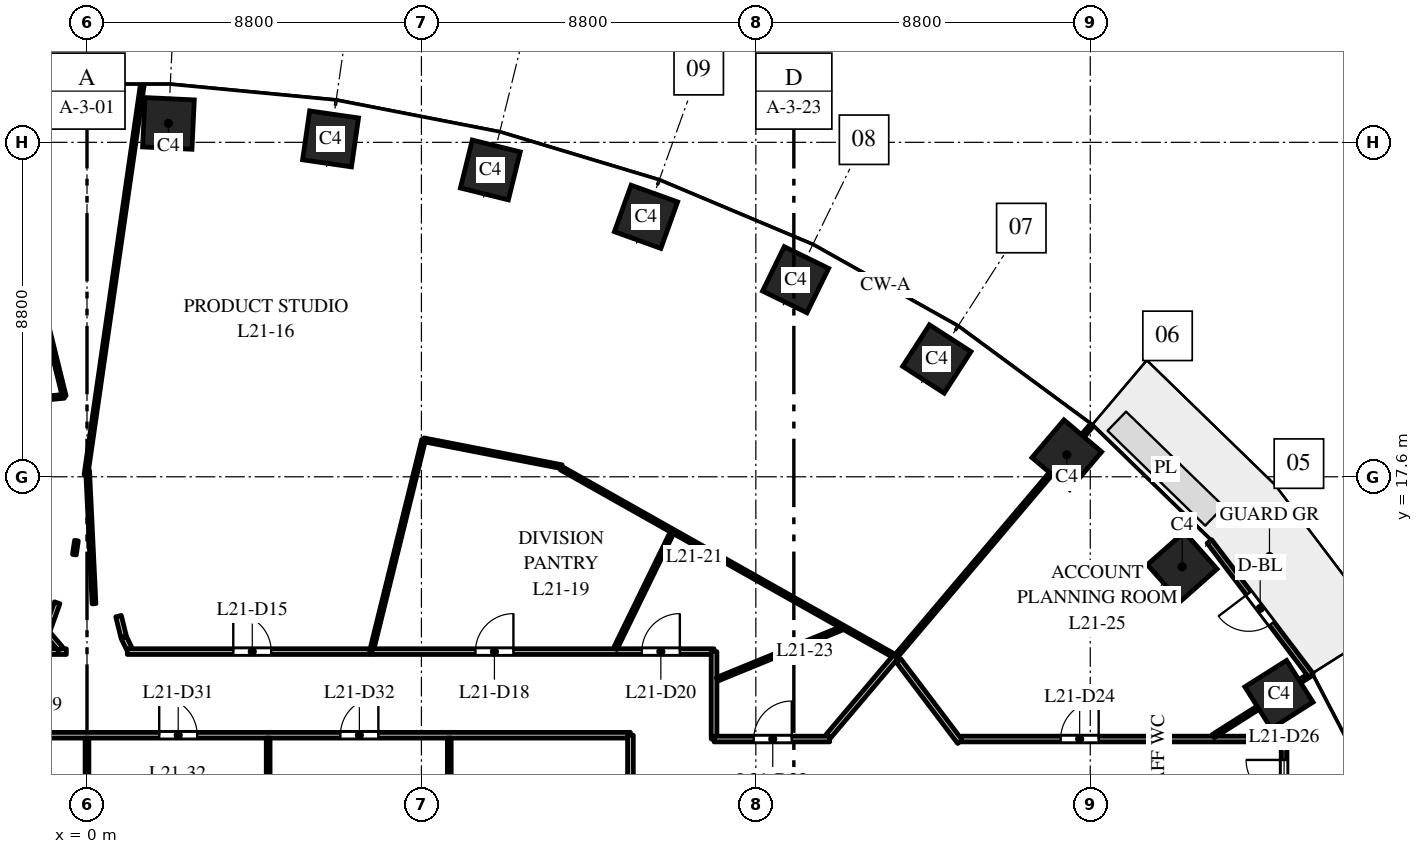
"""IFC4 building model, lengths in metres.
Left out: names, types, materials, properties, quantities, classifications, styles, units other than length and angle.
Written with IfcOpenShell. Run it as: python <this file> out.ifc"""

import sys

from ifc_helpers import new_model, si_unit, direction, frame, frame_2d, origin, origin_2d, place, context, subcontext, project, spatial, rectangle, extrude, element, fill, save


model = new_model("IFC4")
c1 = context("Model", 3, precision=1e-05, world=origin(), true_north=direction((0.0, 1.0)))
c2 = subcontext(c1, "Body", "Model", "MODEL_VIEW")
j1 = project(units=[si_unit("LENGTHUNIT", "METRE"), si_unit("PLANEANGLEUNIT", "RADIAN")], contexts=[c1])
p1 = place(None, origin())
s1 = spatial("IfcSite", under=j1, at=p1, CompositionType="ELEMENT")
p2 = place(p1, origin())
s2 = spatial("IfcBuilding", under=s1, at=p2, CompositionType="ELEMENT")
p3 = place(p2, frame((0.0, 0.0, 96.0)))
s3 = spatial("IfcBuildingStorey", under=s2, at=p3, CompositionType="ELEMENT", Elevation=96.0)
for number, where, z_axis, x_axis in (
    (1, (31.365, 11.871, 0.0), (0.0, 0.0, 1.0), (-0.535, 0.845, 0.0)),
    (2, (28.819, 15.23, 0.0), (0.0, 0.0, 1.0), (-0.663, 0.749, 0.0)),
    (3, (25.783, 18.18, 0.0), (0.0, 0.0, 1.0), (-0.763, 0.646, 0.0)),
    (4, (22.362, 20.7, 0.0), (0.0, 0.0, 1.0), (-0.84, 0.542, 0.0)),
    (5, (18.646, 22.785, 0.0), (0.0, 0.0, 1.0), (-0.898, 0.439, 0.0)),
    (6, (14.709, 24.441, 0.0), (0.0, 0.0, 1.0), (-0.941, 0.338, 0.0)),
    (7, (10.613, 25.674, 0.0), (0.0, 0.0, 1.0), (-0.971, 0.24, 0.0)),
    (8, (6.409, 26.491, 0.0), (0.0, 0.0, 1.0), (-0.99, 0.143, 0.0)),
    (9, (2.143, 26.898, 0.0), (0.0, 0.0, 1.0), (-0.999, 0.048, 0.0)),
):
    element("IfcColumn", number, at=place(p3, frame(where, z_axis=z_axis, x_axis=x_axis)), inside=s3, PredefinedType="COLUMN", context=c2, shape_type="SweptSolid", body=[
        extrude(rectangle(XDim=1.3, YDim=1.3, at=origin_2d()), origin(), (0.0, 0.0, 1.0), 4.0),
    ])
p4 = place(p3, frame((32.208, 12.374, 0.0), z_axis=(0.0, 0.0, 1.0), x_axis=(-0.604045763106, 0.796949632081, 0.0)))
e10 = element("IfcWall", 10, at=p4, inside=s3, PredefinedType="STANDARD", context=c2, shape_type="SweptSolid", body=[
    extrude(rectangle(XDim=4.423, YDim=0.15, at=frame_2d((2.212, 0.0))), origin(), (0.0, 0.0, 1.0), 3.7),
])
p5 = place(p4, frame((1.712, 0.0, 0.0)))
e11 = element("IfcOpeningElement", 11, at=p5, cuts=e10, PredefinedType="OPENING", context=c2, shape_type="SweptSolid", body=[
    extrude(rectangle(XDim=1.0, YDim=2.4, at=frame_2d((0.5, 1.2))), frame((0.0, 0.085, 0.0), z_axis=(0.0, -1.0, 0.0), x_axis=(1.0, 0.0, 0.0)), (0.0, 0.0, 1.0), 0.17),
])
p6 = place(p3, frame((-14.3, 10.8, 0.0), z_axis=(0.0, 0.0, 1.0), x_axis=(1.0, 0.0, 0.0)))
e12 = element("IfcWall", 12, at=p6, inside=s3, PredefinedType="PARTITIONING", context=c2, shape_type="SweptSolid", body=[
    extrude(rectangle(XDim=28.6, YDim=0.15, at=frame_2d((14.3, 0.0))), origin(), (0.0, 0.0, 1.0), 2.85),
])
p7 = place(p6, frame((11.433, 0.0, 0.0)))
e13 = element("IfcOpeningElement", 13, at=p7, cuts=e12, PredefinedType="OPENING", context=c2, shape_type="SweptSolid", body=[
    extrude(rectangle(XDim=1.0, YDim=2.1, at=frame_2d((0.5, 1.05))), frame((0.0, 0.085, 0.0), z_axis=(0.0, -1.0, 0.0), x_axis=(1.0, 0.0, 0.0)), (0.0, 0.0, 1.0), 0.17),
])
p8 = place(p6, frame((16.2, 0.0, 0.0)))
e14 = element("IfcOpeningElement", 14, at=p8, cuts=e12, PredefinedType="OPENING", context=c2, shape_type="SweptSolid", body=[
    extrude(rectangle(XDim=1.0, YDim=2.1, at=frame_2d((0.5, 1.05))), frame((0.0, 0.085, 0.0), z_axis=(0.0, -1.0, 0.0), x_axis=(1.0, 0.0, 0.0)), (0.0, 0.0, 1.0), 0.17),
])
p9 = place(p6, frame((20.967, 0.0, 0.0)))
e15 = element("IfcOpeningElement", 15, at=p9, cuts=e12, PredefinedType="OPENING", context=c2, shape_type="SweptSolid", body=[
    extrude(rectangle(XDim=1.0, YDim=2.1, at=frame_2d((0.5, 1.05))), frame((0.0, 0.085, 0.0), z_axis=(0.0, -1.0, 0.0), x_axis=(1.0, 0.0, 0.0)), (0.0, 0.0, 1.0), 0.17),
])
p10 = place(p3, frame((-8.802, 18.935, 0.0), z_axis=(0.0, 0.0, 1.0), x_axis=(0.995486812939, 0.094899975054, 0.0)))
e16 = element("IfcWall", 16, at=p10, inside=s3, PredefinedType="PARTITIONING", context=c2, shape_type="SweptSolid", body=[
    extrude(rectangle(XDim=8.24, YDim=0.1, at=frame_2d((4.12, 0.0))), origin(), (0.0, 0.0, 1.0), 2.85),
])
p11 = place(p3, frame((-7.767, 13.0, 0.0), z_axis=(0.0, 0.0, 1.0), x_axis=(1.0, 0.0, 0.0)))
e17 = element("IfcWall", 17, at=p11, inside=s3, PredefinedType="PARTITIONING", context=c2, shape_type="SweptSolid", body=[
    extrude(rectangle(XDim=7.223, YDim=0.15, at=frame_2d((3.612, 0.0))), origin(), (0.0, 0.0, 1.0), 2.85),
])
p12 = place(p11, frame((2.974, 0.0, 0.0)))
e18 = element("IfcOpeningElement", 18, at=p12, cuts=e17, PredefinedType="OPENING", context=c2, shape_type="SweptSolid", body=[
    extrude(rectangle(XDim=1.0, YDim=2.1, at=frame_2d((0.5, 1.05))), frame((0.0, 0.085, 0.0), z_axis=(0.0, -1.0, 0.0), x_axis=(1.0, 0.0, 0.0)), (0.0, 0.0, 1.0), 0.17),
])
p13 = place(p3, frame((-2.609, 27.858, 0.0), z_axis=(0.0, 0.0, 1.0), x_axis=(0.239677840558, -0.970852477334, 0.0)))
e19 = element("IfcWall", 19, at=p13, inside=s3, PredefinedType="PARTITIONING", context=c2, shape_type="SweptSolid", body=[
    extrude(rectangle(XDim=8.385, YDim=0.1, at=frame_2d((4.193, 0.0))), origin(), (0.0, 0.0, 1.0), 2.85),
])
p14 = place(p3, frame((-1.122, 13.57, 0.0), z_axis=(0.0, 0.0, 1.0), x_axis=(0.648780487805, -0.760975609756, 0.0)))
e20 = element("IfcWall", 20, at=p14, inside=s3, PredefinedType="PARTITIONING", context=c2, shape_type="SweptSolid", body=[
    extrude(rectangle(XDim=0.651, YDim=0.15, at=frame_2d((0.325, 0.0))), origin(), (0.0, 0.0, 1.0), 2.85),
])
p15 = place(p3, frame((-1.035, 13.586, 0.0), z_axis=(0.0, 0.0, 1.0), x_axis=(0.337939421495, 0.941167863561, 0.0)))
e21 = element("IfcWall", 21, at=p15, inside=s3, PredefinedType="PARTITIONING", context=c2, shape_type="SweptSolid", body=[
    extrude(rectangle(XDim=0.743, YDim=0.15, at=frame_2d((0.371, 0.0))), origin(), (0.0, 0.0, 1.0), 2.85),
])
p16 = place(p3, frame((-0.331, 15.551, 0.0), z_axis=(0.0, 0.0, 1.0), x_axis=(0.142155020728, 0.989844407006, 0.0)))
e22 = element("IfcWall", 22, at=p16, inside=s3, PredefinedType="PARTITIONING", context=c2, shape_type="SweptSolid", body=[
    extrude(rectangle(XDim=0.373, YDim=0.1, at=frame_2d((0.187, 0.0))), origin(), (0.0, 0.0, 1.0), 3.7),
])
p17 = place(p3, frame((-0.027, 17.654, 0.0), z_axis=(0.0, 0.0, 1.0), x_axis=(0.142950746257, 0.989729803605, 0.0)))
e23 = element("IfcWall", 23, at=p17, inside=s3, PredefinedType="PARTITIONING", context=c2, shape_type="SweptSolid", body=[
    extrude(rectangle(XDim=10.346, YDim=0.1, at=frame_2d((5.173, 0.0))), origin(), (0.0, 0.0, 1.0), 2.9),
])
p18 = place(p3, frame((0.0, 7.504, 0.0), z_axis=(0.0, 0.0, 1.0), x_axis=(0.0, 1.0, 0.0)))
e24 = element("IfcWall", 24, at=p18, inside=s3, PredefinedType="PARTITIONING", context=c2, shape_type="SweptSolid", body=[
    extrude(rectangle(XDim=3.221, YDim=0.1, at=frame_2d((1.611, 0.0))), origin(), (0.0, 0.0, 1.0), 3.7),
])
p19 = place(p3, frame((0.016, 17.767, 0.0), z_axis=(0.0, 0.0, 1.0), x_axis=(0.047839350467, -0.99885504281, 0.0)))
e25 = element("IfcWall", 25, at=p19, inside=s3, PredefinedType="PARTITIONING", context=c2, shape_type="SweptSolid", body=[
    extrude(rectangle(XDim=3.511, YDim=0.1, at=frame_2d((1.755, 0.0))), origin(), (0.0, 0.0, 1.0), 3.7),
])
p20 = place(p3, frame((0.83, 13.933, 0.0), z_axis=(0.0, 0.0, 1.0), x_axis=(0.239578315167, -0.970877042113, 0.0)))
e26 = element("IfcWall", 26, at=p20, inside=s3, PredefinedType="PARTITIONING", context=c2, shape_type="SweptSolid", body=[
    extrude(rectangle(XDim=0.563, YDim=0.15, at=frame_2d((0.282, 0.0))), origin(), (0.0, 0.0, 1.0), 3.7),
])
p21 = place(p3, frame((0.969, 13.369, 0.0), z_axis=(0.0, 0.0, 1.0), x_axis=(0.440240923942, -0.897879685084, 0.0)))
e27 = element("IfcWall", 27, at=p21, inside=s3, PredefinedType="PARTITIONING", context=c2, shape_type="SweptSolid", body=[
    extrude(rectangle(XDim=0.323, YDim=0.15, at=frame_2d((0.161, 0.0))), origin(), (0.0, 0.0, 1.0), 3.7),
])
p22 = place(p3, frame((1.061, 13.0, 0.0), z_axis=(0.0, 0.0, 1.0), x_axis=(1.0, 0.0, 0.0)))
e28 = element("IfcWall", 28, at=p22, inside=s3, PredefinedType="PARTITIONING", context=c2, shape_type="SweptSolid", body=[
    extrude(rectangle(XDim=6.422, YDim=0.15, at=frame_2d((3.211, 0.0))), origin(), (0.0, 0.0, 1.0), 2.85),
])
p23 = place(p22, frame((2.788, 0.0, 0.0)))
e29 = element("IfcOpeningElement", 29, at=p23, cuts=e28, PredefinedType="OPENING", context=c2, shape_type="SweptSolid", body=[
    extrude(rectangle(XDim=1.0, YDim=2.1, at=frame_2d((0.5, 1.05))), frame((0.0, 0.085, 0.0), z_axis=(0.0, -1.0, 0.0), x_axis=(1.0, 0.0, 0.0)), (0.0, 0.0, 1.0), 0.17),
])
p24 = place(p3, frame((4.767, 6.363, 0.0), z_axis=(0.0, 0.0, 1.0), x_axis=(0.0, 1.0, 0.0)))
e30 = element("IfcWall", 30, at=p24, inside=s3, PredefinedType="PARTITIONING", context=c2, shape_type="SweptSolid", body=[
    extrude(rectangle(XDim=4.362, YDim=0.1, at=frame_2d((2.181, 0.0))), origin(), (0.0, 0.0, 1.0), 2.85),
])
p25 = place(p3, frame((7.483, 13.0, 0.0), z_axis=(0.0, 0.0, 1.0), x_axis=(0.239702552944, 0.970846376165, 0.0)))
e31 = element("IfcWall", 31, at=p25, inside=s3, PredefinedType="PARTITIONING", context=c2, shape_type="SweptSolid", body=[
    extrude(rectangle(XDim=5.74, YDim=0.1, at=frame_2d((2.87, 0.0))), origin(), (0.0, 0.0, 1.0), 3.7),
])
p26 = place(p3, frame((7.499, 13.0, 0.0), z_axis=(0.0, 0.0, 1.0), x_axis=(1.0, 0.0, 0.0)))
e32 = element("IfcWall", 32, at=p26, inside=s3, PredefinedType="PARTITIONING", context=c2, shape_type="SweptSolid", body=[
    extrude(rectangle(XDim=9.001, YDim=0.15, at=frame_2d((4.5, 0.0))), origin(), (0.0, 0.0, 1.0), 2.85),
])
p27 = place(p26, frame((2.722, 0.0, 0.0)))
e33 = element("IfcOpeningElement", 33, at=p27, cuts=e32, PredefinedType="OPENING", context=c2, shape_type="SweptSolid", body=[
    extrude(rectangle(XDim=1.0, YDim=2.1, at=frame_2d((0.5, 1.05))), frame((0.0, 0.085, 0.0), z_axis=(0.0, -1.0, 0.0), x_axis=(1.0, 0.0, 0.0)), (0.0, 0.0, 1.0), 0.17),
])
p28 = place(p26, frame((7.101, 0.0, 0.0)))
e34 = element("IfcOpeningElement", 34, at=p28, cuts=e32, PredefinedType="OPENING", context=c2, shape_type="SweptSolid", body=[
    extrude(rectangle(XDim=1.0, YDim=2.1, at=frame_2d((0.5, 1.05))), frame((0.0, 0.085, 0.0), z_axis=(0.0, -1.0, 0.0), x_axis=(1.0, 0.0, 0.0)), (0.0, 0.0, 1.0), 0.17),
])
p29 = place(p3, frame((8.859, 18.573, 0.0), z_axis=(0.0, 0.0, 1.0), x_axis=(0.981554610727, -0.191181971328, 0.0)))
e35 = element("IfcWall", 35, at=p29, inside=s3, PredefinedType="PARTITIONING", context=c2, shape_type="SweptSolid", body=[
    extrude(rectangle(XDim=3.703, YDim=0.1, at=frame_2d((1.852, 0.0))), origin(), (0.0, 0.0, 1.0), 2.85),
])
p30 = place(p3, frame((9.533, -10.725, 0.0), z_axis=(0.0, 0.0, 1.0), x_axis=(0.0, 1.0, 0.0)))
e36 = element("IfcWall", 36, at=p30, inside=s3, PredefinedType="PARTITIONING", context=c2, shape_type="SweptSolid", body=[
    extrude(rectangle(XDim=21.45, YDim=0.1, at=frame_2d((10.725, 0.0))), origin(), (0.0, 0.0, 1.0), 2.75),
])
p31 = place(p3, frame((12.48, 17.825, 0.0), z_axis=(0.0, 0.0, 1.0), x_axis=(0.871131718637, -0.491049415827, 0.0)))
e37 = element("IfcWall", 37, at=p31, inside=s3, PredefinedType="PARTITIONING", context=c2, shape_type="SweptSolid", body=[
    extrude(rectangle(XDim=10.101, YDim=0.1, at=frame_2d((5.05, 0.0))), origin(), (0.0, 0.0, 1.0), 3.7),
])
p32 = place(p3, frame((13.899, 13.075, 0.0), z_axis=(0.0, 0.0, 1.0), x_axis=(0.439170148288, 0.898403907412, 0.0)))
e38 = element("IfcWall", 38, at=p32, inside=s3, PredefinedType="PARTITIONING", context=c2, shape_type="SweptSolid", body=[
    extrude(rectangle(XDim=3.395, YDim=0.1, at=frame_2d((1.698, 0.0))), origin(), (0.0, 0.0, 1.0), 3.7),
])
p33 = place(p3, frame((14.3, -10.8, 0.0), z_axis=(0.0, 0.0, 1.0), x_axis=(0.0, 1.0, 0.0)))
e39 = element("IfcWall", 39, at=p33, inside=s3, PredefinedType="PARTITIONING", context=c2, shape_type="SweptSolid", body=[
    extrude(rectangle(XDim=21.6, YDim=0.15, at=frame_2d((10.8, 0.0))), origin(), (0.0, 0.0, 1.0), 2.75),
])
p34 = place(p33, frame((10.2, 0.0, 0.0)))
e40 = element("IfcOpeningElement", 40, at=p34, cuts=e39, PredefinedType="OPENING", context=c2, shape_type="SweptSolid", body=[
    extrude(rectangle(XDim=1.0, YDim=2.1, at=frame_2d((0.5, 1.05))), frame((0.0, 0.085, 0.0), z_axis=(0.0, -1.0, 0.0), x_axis=(1.0, 0.0, 0.0)), (0.0, 0.0, 1.0), 0.17),
])
p35 = place(p3, frame((16.5, 10.7, 0.0), z_axis=(0.0, 0.0, 1.0), x_axis=(0.0, 1.0, 0.0)))
e41 = element("IfcWall", 41, at=p35, inside=s3, PredefinedType="PARTITIONING", context=c2, shape_type="SweptSolid", body=[
    extrude(rectangle(XDim=2.3, YDim=0.15, at=frame_2d((1.15, 0.0))), origin(), (0.0, 0.0, 1.0), 3.7),
])
p36 = place(p3, frame((16.5, 10.7, 0.0), z_axis=(0.0, 0.0, 1.0), x_axis=(1.0, 0.0, 0.0)))
e42 = element("IfcWall", 42, at=p36, inside=s3, PredefinedType="PARTITIONING", context=c2, shape_type="SweptSolid", body=[
    extrude(rectangle(XDim=3.043, YDim=0.15, at=frame_2d((1.521, 0.0))), origin(), (0.0, 0.0, 1.0), 3.7),
])
p37 = place(p36, frame((1.045, 0.0, 0.0)))
e43 = element("IfcOpeningElement", 43, at=p37, cuts=e42, PredefinedType="OPENING", context=c2, shape_type="SweptSolid", body=[
    extrude(rectangle(XDim=1.0, YDim=2.1, at=frame_2d((0.5, 1.05))), frame((0.0, 0.085, 0.0), z_axis=(0.0, -1.0, 0.0), x_axis=(1.0, 0.0, 0.0)), (0.0, 0.0, 1.0), 0.17),
])
p38 = place(p3, frame((16.579, 12.271, 0.0), z_axis=(0.0, 0.0, 1.0), x_axis=(0.925511782592, 0.378718814272, 0.0)))
e44 = element("IfcWall", 44, at=p38, inside=s3, PredefinedType="PARTITIONING", context=c2, shape_type="SweptSolid", body=[
    extrude(rectangle(XDim=3.539, YDim=0.1, at=frame_2d((1.769, 0.0))), origin(), (0.0, 0.0, 1.0), 3.7),
])
p39 = place(p3, frame((19.511, 10.778, 0.0), z_axis=(0.0, 0.0, 1.0), x_axis=(0.64641426768, 0.762986628021, 0.0)))
e45 = element("IfcWall", 45, at=p39, inside=s3, PredefinedType="PARTITIONING", context=c2, shape_type="SweptSolid", body=[
    extrude(rectangle(XDim=2.735, YDim=0.15, at=frame_2d((1.368, 0.0))), origin(), (0.0, 0.0, 1.0), 3.7),
])
p40 = place(p3, frame((21.355, 12.765, 0.0), z_axis=(0.0, 0.0, 1.0), x_axis=(0.603391001626, -0.797445483502, 0.0)))
e46 = element("IfcWall", 46, at=p40, inside=s3, PredefinedType="PARTITIONING", context=c2, shape_type="SweptSolid", body=[
    extrude(rectangle(XDim=2.68, YDim=0.15, at=frame_2d((1.34, 0.0))), origin(), (0.0, 0.0, 1.0), 2.75),
])
p41 = place(p3, frame((21.279, 12.865, 0.0), z_axis=(0.0, 0.0, 1.0), x_axis=(0.646395355102, 0.763002650652, 0.0)))
e47 = element("IfcWall", 47, at=p41, inside=s3, PredefinedType="PARTITIONING", context=c2, shape_type="SweptSolid", body=[
    extrude(rectangle(XDim=7.969, YDim=0.1, at=frame_2d((3.984, 0.0))), origin(), (0.0, 0.0, 1.0), 2.9),
])
p42 = place(p3, frame((23.011, 10.7, 0.0), z_axis=(0.0, 0.0, 1.0), x_axis=(1.0, 0.0, 0.0)))
e48 = element("IfcWall", 48, at=p42, inside=s3, PredefinedType="PARTITIONING", context=c2, shape_type="SweptSolid", body=[
    extrude(rectangle(XDim=8.489, YDim=0.15, at=frame_2d((4.245, 0.0))), origin(), (0.0, 0.0, 1.0), 2.9),
])
p43 = place(p42, frame((2.61, 0.0, 0.0)))
e49 = element("IfcOpeningElement", 49, at=p43, cuts=e48, PredefinedType="OPENING", context=c2, shape_type="SweptSolid", body=[
    extrude(rectangle(XDim=1.0, YDim=2.1, at=frame_2d((0.5, 1.05))), frame((0.0, 0.085, 0.0), z_axis=(0.0, -1.0, 0.0), x_axis=(1.0, 0.0, 0.0)), (0.0, 0.0, 1.0), 0.17),
])
p44 = place(p3, frame((29.637, 10.777, 0.0), z_axis=(0.0, 0.0, 1.0), x_axis=(0.844810627195, 0.535065420467, 0.0)))
e50 = element("IfcWall", 50, at=p44, inside=s3, PredefinedType="PARTITIONING", context=c2, shape_type="SweptSolid", body=[
    extrude(rectangle(XDim=3.048, YDim=0.1, at=frame_2d((1.524, 0.0))), origin(), (0.0, 0.0, 1.0), 2.9),
])
p45 = place(p3, frame((31.5, 8.5, 0.0), z_axis=(0.0, 0.0, 1.0), x_axis=(0.0, 1.0, 0.0)))
e51 = element("IfcWall", 51, at=p45, inside=s3, PredefinedType="PARTITIONING", context=c2, shape_type="SweptSolid", body=[
    extrude(rectangle(XDim=2.2, YDim=0.15, at=frame_2d((1.1, 0.0))), origin(), (0.0, 0.0, 1.0), 2.9),
])
p46 = place(p45, frame((0.65, 0.0, 0.0)))
e52 = element("IfcOpeningElement", 52, at=p46, cuts=e51, PredefinedType="OPENING", context=c2, shape_type="SweptSolid", body=[
    extrude(rectangle(XDim=1.0, YDim=2.1, at=frame_2d((0.5, 1.05))), frame((0.0, 0.085, 0.0), z_axis=(0.0, -1.0, 0.0), x_axis=(1.0, 0.0, 0.0)), (0.0, 0.0, 1.0), 0.17),
])
p47 = place(p5, origin())
e53 = element("IfcDoor", 53, at=p47, inside=s3, OperationType="SINGLE_SWING_RIGHT", PredefinedType="DOOR", context=c2, shape_type="SweptSolid", body=[
    extrude(rectangle(XDim=1.0, YDim=2.4, at=frame_2d((0.5, 1.2))), frame((0.0, 0.025, 0.0), z_axis=(0.0, -1.0, 0.0), x_axis=(1.0, 0.0, 0.0)), (0.0, 0.0, 1.0), 0.05),
])
fill(e11, e53)
p48 = place(p23, origin())
e54 = element("IfcDoor", 54, at=p48, inside=s3, OperationType="SINGLE_SWING_LEFT", PredefinedType="DOOR", context=c2, shape_type="SweptSolid", body=[
    extrude(rectangle(XDim=1.0, YDim=2.1, at=frame_2d((0.5, 1.05))), frame((0.0, 0.025, 0.0), z_axis=(0.0, -1.0, 0.0), x_axis=(1.0, 0.0, 0.0)), (0.0, 0.0, 1.0), 0.05),
])
fill(e29, e54)
p49 = place(p27, origin())
e55 = element("IfcDoor", 55, at=p49, inside=s3, OperationType="SINGLE_SWING_RIGHT", PredefinedType="DOOR", context=c2, shape_type="SweptSolid", body=[
    extrude(rectangle(XDim=1.0, YDim=2.1, at=frame_2d((0.5, 1.05))), frame((0.0, 0.025, 0.0), z_axis=(0.0, -1.0, 0.0), x_axis=(1.0, 0.0, 0.0)), (0.0, 0.0, 1.0), 0.05),
])
fill(e33, e55)
p50 = place(p28, origin())
e56 = element("IfcDoor", 56, at=p50, inside=s3, OperationType="SINGLE_SWING_RIGHT", PredefinedType="DOOR", context=c2, shape_type="SweptSolid", body=[
    extrude(rectangle(XDim=1.0, YDim=2.1, at=frame_2d((0.5, 1.05))), frame((0.0, 0.025, 0.0), z_axis=(0.0, -1.0, 0.0), x_axis=(1.0, 0.0, 0.0)), (0.0, 0.0, 1.0), 0.05),
])
fill(e34, e56)
p51 = place(p37, origin())
e57 = element("IfcDoor", 57, at=p51, inside=s3, OperationType="SINGLE_SWING_RIGHT", PredefinedType="DOOR", context=c2, shape_type="SweptSolid", body=[
    extrude(rectangle(XDim=1.0, YDim=2.1, at=frame_2d((0.5, 1.05))), frame((0.0, 0.025, 0.0), z_axis=(0.0, -1.0, 0.0), x_axis=(1.0, 0.0, 0.0)), (0.0, 0.0, 1.0), 0.05),
])
fill(e43, e57)
p52 = place(p43, origin())
e58 = element("IfcDoor", 58, at=p52, inside=s3, OperationType="SINGLE_SWING_RIGHT", PredefinedType="DOOR", context=c2, shape_type="SweptSolid", body=[
    extrude(rectangle(XDim=1.0, YDim=2.1, at=frame_2d((0.5, 1.05))), frame((0.0, 0.025, 0.0), z_axis=(0.0, -1.0, 0.0), x_axis=(1.0, 0.0, 0.0)), (0.0, 0.0, 1.0), 0.05),
])
fill(e49, e58)
p53 = place(p46, origin())
e59 = element("IfcDoor", 59, at=p53, inside=s3, OperationType="SINGLE_SWING_RIGHT", PredefinedType="DOOR", context=c2, shape_type="SweptSolid", body=[
    extrude(rectangle(XDim=1.0, YDim=2.1, at=frame_2d((0.5, 1.05))), frame((0.0, 0.025, 0.0), z_axis=(0.0, -1.0, 0.0), x_axis=(1.0, 0.0, 0.0)), (0.0, 0.0, 1.0), 0.05),
])
fill(e52, e59)
p54 = place(p8, origin())
e60 = element("IfcDoor", 60, at=p54, inside=s3, OperationType="SINGLE_SWING_LEFT", PredefinedType="DOOR", context=c2, shape_type="SweptSolid", body=[
    extrude(rectangle(XDim=1.0, YDim=2.1, at=frame_2d((0.5, 1.05))), frame((0.0, 0.025, 0.0), z_axis=(0.0, -1.0, 0.0), x_axis=(1.0, 0.0, 0.0)), (0.0, 0.0, 1.0), 0.05),
])
fill(e14, e60)
p55 = place(p9, origin())
e61 = element("IfcDoor", 61, at=p55, inside=s3, OperationType="SINGLE_SWING_RIGHT", PredefinedType="DOOR", context=c2, shape_type="SweptSolid", body=[
    extrude(rectangle(XDim=1.0, YDim=2.1, at=frame_2d((0.5, 1.05))), frame((0.0, 0.025, 0.0), z_axis=(0.0, -1.0, 0.0), x_axis=(1.0, 0.0, 0.0)), (0.0, 0.0, 1.0), 0.05),
])
fill(e15, e61)
save(model, sys.argv[1])
